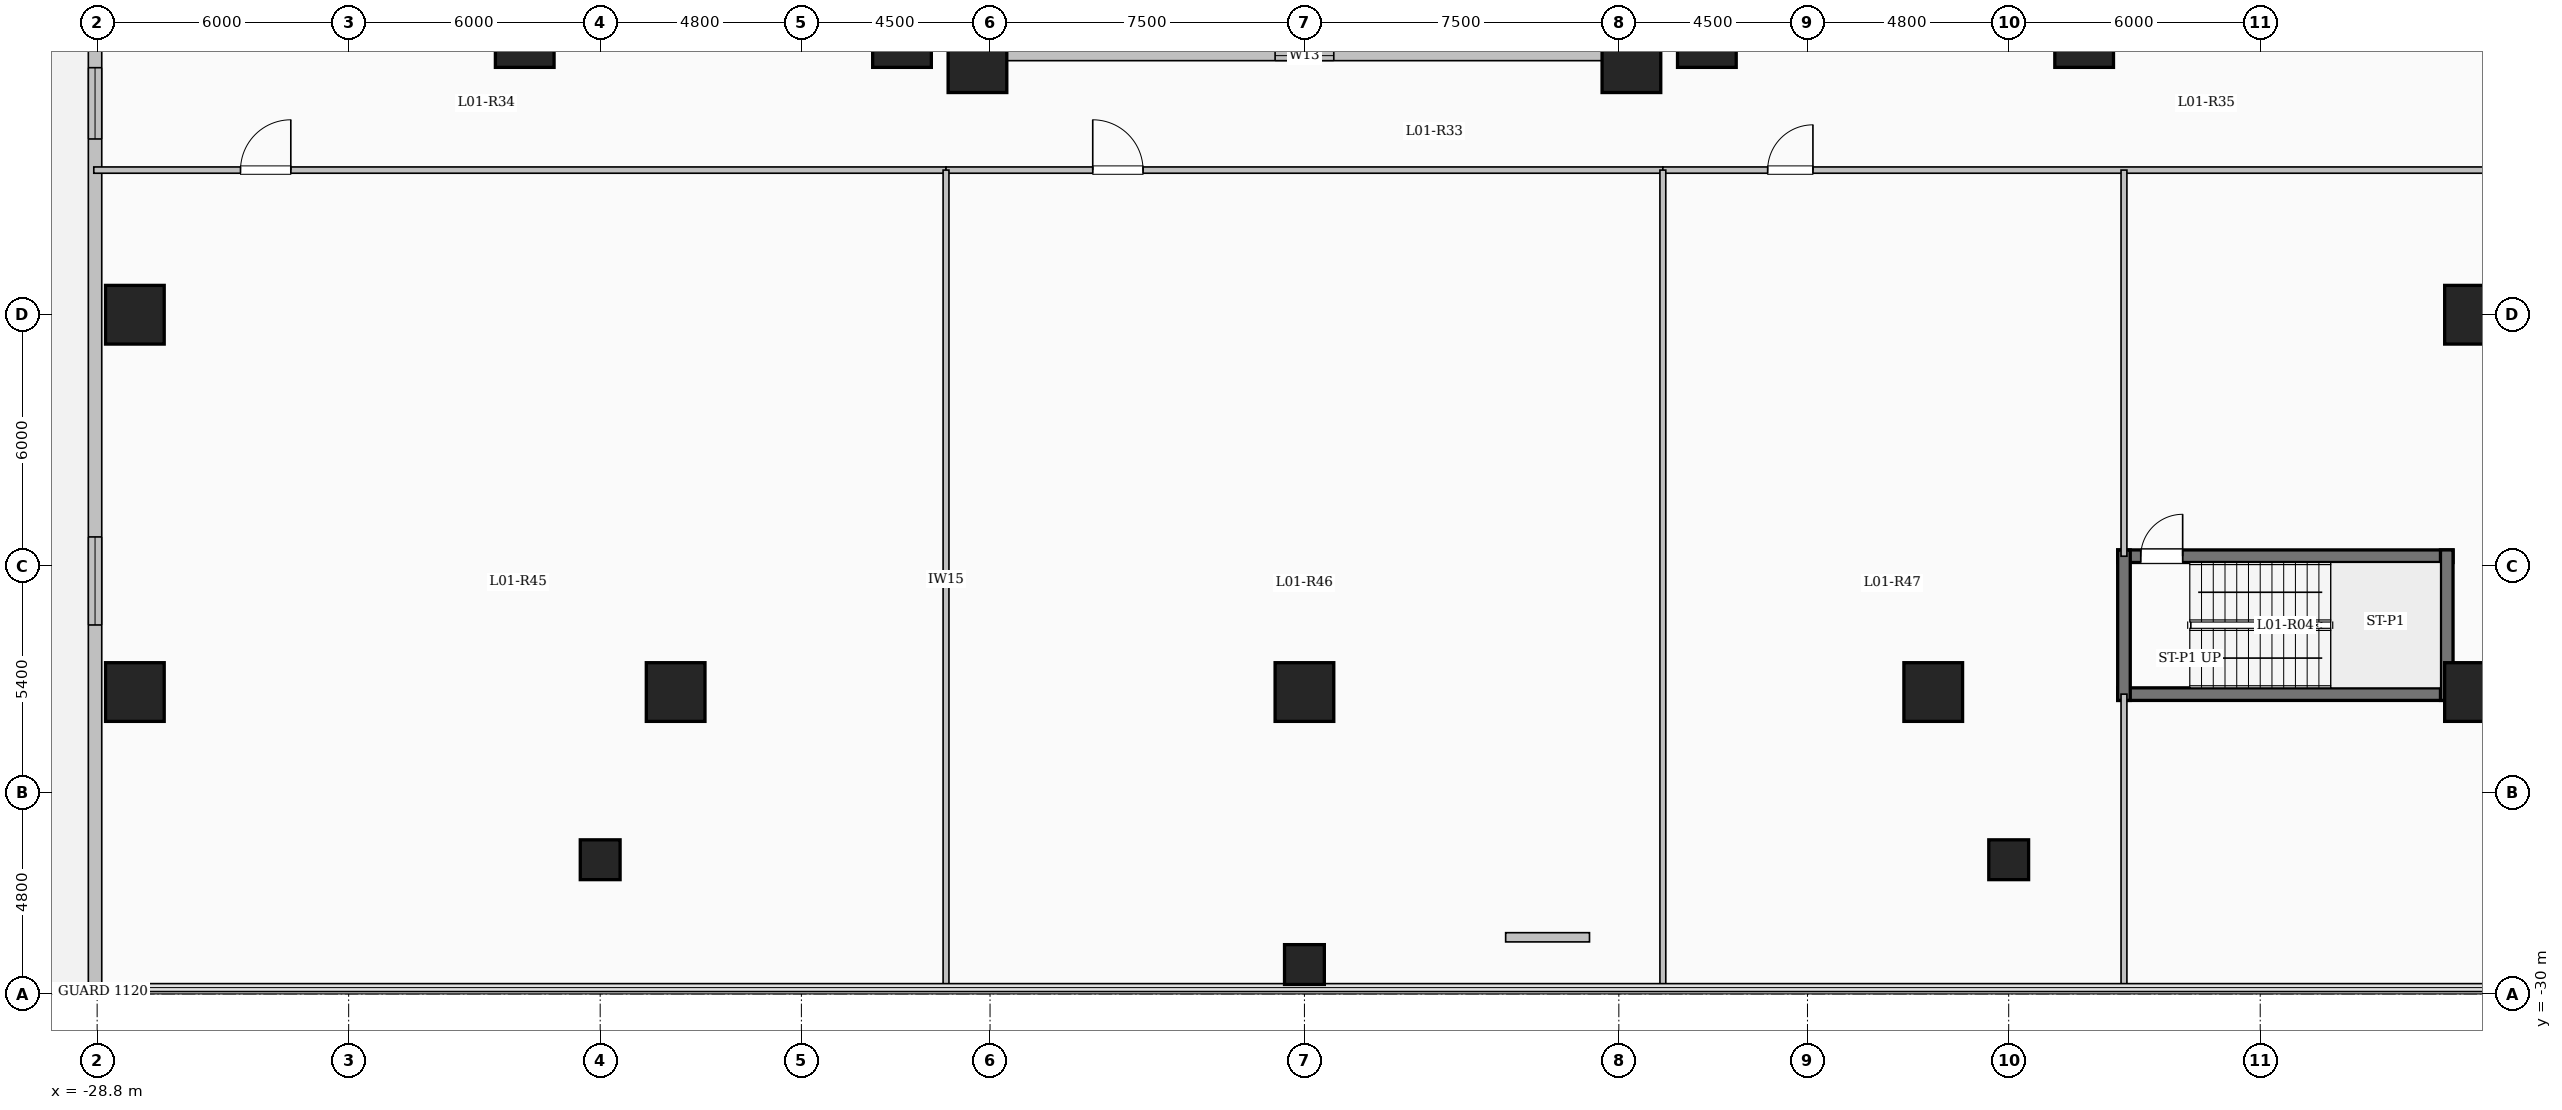
"""IFC4 building model, lengths in metres.
Left out: names, types, materials, properties, quantities, classifications, styles, units other than length and angle.
Written with IfcOpenShell. Run it as: python <this file> out.ifc"""

import sys

from ifc_helpers import new_model, si_unit, direction, frame, frame_2d, origin, origin_2d, place, context, subcontext, project, spatial, rectangle, circle, extrude, element, fill, save


model = new_model("IFC4")
c1 = context("Model", 3, precision=1e-05, world=origin(), true_north=direction((0.0, 1.0)))
c2 = subcontext(c1, "Body", "Model", "MODEL_VIEW")
j1 = project(units=[si_unit("LENGTHUNIT", "METRE"), si_unit("PLANEANGLEUNIT", "RADIAN")], contexts=[c1])
p1 = place(None, origin())
s1 = spatial("IfcSite", under=j1, at=p1, CompositionType="ELEMENT")
p2 = place(p1, origin())
s2 = spatial("IfcBuilding", under=s1, at=p2, CompositionType="ELEMENT")
p3 = place(p2, frame((0.0, 0.0, 5.4)))
s3 = spatial("IfcBuildingStorey", under=s2, at=p3, CompositionType="ELEMENT", Elevation=5.4)
for number, where, z_axis, x_axis in (
    (1, (-7.8, -7.8, 0.0), (0.0, 0.0, 1.0), (1.0, 0.0, 0.0)),
    (2, (7.8, -7.8, 0.0), (0.0, 0.0, 1.0), (1.0, 0.0, 0.0)),
    (3, (-9.6, -7.2, 0.0), (0.0, 0.0, 1.0), (1.0, 0.0, 0.0)),
    (4, (9.6, -7.2, 0.0), (0.0, 0.0, 1.0), (1.0, 0.0, 0.0)),
    (5, (-18.6, -7.2, 0.0), (0.0, 0.0, 1.0), (1.0, 0.0, 0.0)),
    (6, (18.6, -7.2, 0.0), (0.0, 0.0, 1.0), (1.0, 0.0, 0.0)),
):
    element("IfcColumn", number, at=place(p3, frame(where, z_axis=z_axis, x_axis=x_axis)), inside=s3, PredefinedType="COLUMN", context=c2, shape_type="SweptSolid", body=[
        extrude(rectangle(XDim=1.4, YDim=1.4, at=origin_2d()), origin(), (0.0, 0.0, 1.0), 4.5),
    ])
for number, where, z_axis, x_axis in (
    (7, (-16.8, -26.8, 0.0), (0.0, 0.0, 1.0), (1.0, 0.0, 0.0)),
    (8, (0.0, -29.3, 0.0), (0.0, 0.0, 1.0), (1.0, 0.0, 0.0)),
    (9, (16.8, -26.8, 0.0), (0.0, 0.0, 1.0), (1.0, 0.0, 0.0)),
):
    element("IfcColumn", number, at=place(p3, frame(where, z_axis=z_axis, x_axis=x_axis)), inside=s3, PredefinedType="PILASTER", context=c2, shape_type="SweptSolid", body=[
        extrude(circle(Radius=0.475, at=origin_2d()), origin(), (0.0, 0.0, 1.0), 4.5),
    ])
for number, where, z_axis, x_axis in (
    (10, (-27.9, -22.8, 0.0), (0.0, 0.0, 1.0), (1.0, 0.0, 0.0)),
    (11, (-15.0, -22.8, 0.0), (0.0, 0.0, 1.0), (1.0, 0.0, 0.0)),
    (12, (0.0, -22.8, 0.0), (0.0, 0.0, 1.0), (1.0, 0.0, 0.0)),
    (13, (15.0, -22.8, 0.0), (0.0, 0.0, 1.0), (1.0, 0.0, 0.0)),
    (14, (27.9, -22.8, 0.0), (0.0, 0.0, 1.0), (1.0, 0.0, 0.0)),
    (15, (-27.9, -13.8, 0.0), (0.0, 0.0, 1.0), (1.0, 0.0, 0.0)),
    (16, (27.9, -13.8, 0.0), (0.0, 0.0, 1.0), (1.0, 0.0, 0.0)),
):
    element("IfcColumn", number, at=place(p3, frame(where, z_axis=z_axis, x_axis=x_axis)), inside=s3, PredefinedType="COLUMN", context=c2, shape_type="SweptSolid", body=[
        extrude(rectangle(XDim=1.4, YDim=1.4, at=origin_2d()), origin(), (0.0, 0.0, 1.0), 4.5),
    ])
p4 = place(p3, frame((-7.62, -7.62, 0.0), z_axis=(0.0, 0.0, 1.0), x_axis=(1.0, 0.0, 0.0)))
e17 = element("IfcWall", 17, at=p4, inside=s3, PredefinedType="SOLIDWALL", context=c2, shape_type="SweptSolid", body=[
    extrude(rectangle(XDim=15.24, YDim=0.24, at=frame_2d((7.62, 0.0))), origin(), (0.0, 0.0, 1.0), 4.2),
])
p5 = place(p4, frame((6.92, 0.0, 0.95)))
e18 = element("IfcOpeningElement", 18, at=p5, cuts=e17, PredefinedType="OPENING", context=c2, shape_type="SweptSolid", body=[
    extrude(rectangle(XDim=1.4, YDim=1.5, at=frame_2d((0.7, 0.75))), frame((0.0, 0.13, 0.0), z_axis=(0.0, -1.0, 0.0), x_axis=(1.0, 0.0, 0.0)), (0.0, 0.0, 1.0), 0.26),
])
p6 = place(p3, frame((7.62, -7.62, 0.0), z_axis=(0.0, 0.0, 1.0), x_axis=(0.0, 1.0, 0.0)))
e19 = element("IfcWall", 19, at=p6, inside=s3, PredefinedType="SOLIDWALL", context=c2, shape_type="SweptSolid", body=[
    extrude(rectangle(XDim=15.24, YDim=0.24, at=frame_2d((7.62, 0.0))), origin(), (0.0, 0.0, 1.0), 4.2),
])
p7 = place(p6, frame((6.92, 0.0, 0.95)))
e20 = element("IfcOpeningElement", 20, at=p7, cuts=e19, PredefinedType="OPENING", context=c2, shape_type="SweptSolid", body=[
    extrude(rectangle(XDim=1.4, YDim=1.5, at=frame_2d((0.7, 0.75))), frame((0.0, 0.13, 0.0), z_axis=(0.0, -1.0, 0.0), x_axis=(1.0, 0.0, 0.0)), (0.0, 0.0, 1.0), 0.26),
])
p8 = place(p3, frame((-7.62, 7.62, 0.0), z_axis=(0.0, 0.0, 1.0), x_axis=(0.0, -1.0, 0.0)))
e21 = element("IfcWall", 21, at=p8, inside=s3, PredefinedType="SOLIDWALL", context=c2, shape_type="SweptSolid", body=[
    extrude(rectangle(XDim=15.24, YDim=0.24, at=frame_2d((7.62, 0.0))), origin(), (0.0, 0.0, 1.0), 4.2),
])
p9 = place(p8, frame((6.92, 0.0, 0.95)))
e22 = element("IfcOpeningElement", 22, at=p9, cuts=e21, PredefinedType="OPENING", context=c2, shape_type="SweptSolid", body=[
    extrude(rectangle(XDim=1.4, YDim=1.5, at=frame_2d((0.7, 0.75))), frame((0.0, 0.13, 0.0), z_axis=(0.0, -1.0, 0.0), x_axis=(1.0, 0.0, 0.0)), (0.0, 0.0, 1.0), 0.26),
])
p10 = place(p3, frame((-28.85, -29.85, 0.0), z_axis=(0.0, 0.0, 1.0), x_axis=(0.0, 1.0, 0.0)))
e23 = element("IfcWall", 23, at=p10, inside=s3, PredefinedType="SOLIDWALL", context=c2, shape_type="SweptSolid", body=[
    extrude(rectangle(XDim=59.7, YDim=0.32, at=frame_2d((29.85, 0.0))), origin(), (0.0, 0.0, 1.0), 4.2),
])
p11 = place(p10, frame((31.25, 0.0, 0.0)))
e24 = element("IfcOpeningElement", 24, at=p11, cuts=e23, PredefinedType="OPENING", context=c2, shape_type="SweptSolid", body=[
    extrude(rectangle(XDim=1.25, YDim=2.25, at=frame_2d((0.625, 1.125))), frame((0.0, 0.17, 0.0), z_axis=(0.0, -1.0, 0.0), x_axis=(1.0, 0.0, 0.0)), (0.0, 0.0, 1.0), 0.34),
])
p12 = place(p10, frame((8.65, 0.0, 0.9)))
e25 = element("IfcOpeningElement", 25, at=p12, cuts=e23, PredefinedType="OPENING", context=c2, shape_type="SweptSolid", body=[
    extrude(rectangle(XDim=2.1, YDim=2.0, at=frame_2d((1.05, 1.0))), frame((0.0, 0.17, 0.0), z_axis=(0.0, -1.0, 0.0), x_axis=(1.0, 0.0, 0.0)), (0.0, 0.0, 1.0), 0.34),
])
p13 = place(p10, frame((20.242, 0.0, 0.9)))
e26 = element("IfcOpeningElement", 26, at=p13, cuts=e23, PredefinedType="OPENING", context=c2, shape_type="SweptSolid", body=[
    extrude(rectangle(XDim=1.7, YDim=1.9, at=frame_2d((0.85, 0.95))), frame((0.0, 0.17, 0.0), z_axis=(0.0, -1.0, 0.0), x_axis=(1.0, 0.0, 0.0)), (0.0, 0.0, 1.0), 0.34),
])
p14 = place(p10, frame((26.03, 0.0, 0.9)))
e27 = element("IfcOpeningElement", 27, at=p14, cuts=e23, PredefinedType="OPENING", context=c2, shape_type="SweptSolid", body=[
    extrude(rectangle(XDim=2.1, YDim=2.0, at=frame_2d((1.05, 1.0))), frame((0.0, 0.17, 0.0), z_axis=(0.0, -1.0, 0.0), x_axis=(1.0, 0.0, 0.0)), (0.0, 0.0, 1.0), 0.34),
])
p15 = place(p10, frame((40.975, 0.0, 0.95)))
e28 = element("IfcOpeningElement", 28, at=p15, cuts=e23, PredefinedType="OPENING", context=c2, shape_type="SweptSolid", body=[
    extrude(rectangle(XDim=1.0, YDim=1.5, at=frame_2d((0.5, 0.75))), frame((0.0, 0.17, 0.0), z_axis=(0.0, -1.0, 0.0), x_axis=(1.0, 0.0, 0.0)), (0.0, 0.0, 1.0), 0.34),
])
p16 = place(p10, frame((50.0, 0.0, 0.9)))
e29 = element("IfcOpeningElement", 29, at=p16, cuts=e23, PredefinedType="OPENING", context=c2, shape_type="SweptSolid", body=[
    extrude(rectangle(XDim=2.1, YDim=2.0, at=frame_2d((1.05, 1.0))), frame((0.0, 0.17, 0.0), z_axis=(0.0, -1.0, 0.0), x_axis=(1.0, 0.0, 0.0)), (0.0, 0.0, 1.0), 0.34),
])
p17 = place(p3, frame((4.8, -28.65, 0.0), z_axis=(0.0, 0.0, 1.0), x_axis=(1.0, 0.0, 0.0)))
e30 = element("IfcWall", 30, at=p17, inside=s3, PredefinedType="PARAPET", context=c2, shape_type="SweptSolid", body=[
    extrude(rectangle(XDim=2.0, YDim=0.22, at=frame_2d((1.0, 0.0))), origin(), (0.0, 0.0, 1.0), 0.85),
])
p18 = place(p3, frame((19.4, -19.56, 0.0), z_axis=(0.0, 0.0, 1.0), x_axis=(1.0, 0.0, 0.0)))
e31 = element("IfcWall", 31, at=p18, inside=s3, PredefinedType="SHEAR", context=c2, shape_type="SweptSolid", body=[
    extrude(rectangle(XDim=8.0, YDim=0.3, at=frame_2d((4.0, 0.0))), origin(), (0.0, 0.0, 1.0), 4.5),
])
p19 = place(p18, frame((0.55, 0.0, 0.0)))
e32 = element("IfcOpeningElement", 32, at=p19, cuts=e31, PredefinedType="OPENING", context=c2, shape_type="SweptSolid", body=[
    extrude(rectangle(XDim=1.0, YDim=2.15, at=frame_2d((0.5, 1.075))), frame((0.0, 0.16, 0.0), z_axis=(0.0, -1.0, 0.0), x_axis=(1.0, 0.0, 0.0)), (0.0, 0.0, 1.0), 0.32),
])
p20 = place(p3, frame((19.4, -22.85, 0.0), z_axis=(0.0, 0.0, 1.0), x_axis=(1.0, 0.0, 0.0)))
e33 = element("IfcWall", 33, at=p20, inside=s3, PredefinedType="SHEAR", context=c2, shape_type="SweptSolid", body=[
    extrude(rectangle(XDim=8.0, YDim=0.3, at=frame_2d((4.0, 0.0))), origin(), (0.0, 0.0, 1.0), 4.5),
])
for number, where, z_axis, x_axis in (
    (34, (19.55, -23.0, 0.0), (0.0, 0.0, 1.0), (0.0, 1.0, 0.0)),
    (35, (27.25, -23.0, 0.0), (0.0, 0.0, 1.0), (0.0, 1.0, 0.0)),
):
    element("IfcWall", number, at=place(p3, frame(where, z_axis=z_axis, x_axis=x_axis)), inside=s3, PredefinedType="SHEAR", context=c2, shape_type="SweptSolid", body=[
        extrude(rectangle(XDim=3.59, YDim=0.3, at=frame_2d((1.795, 0.0))), origin(), (0.0, 0.0, 1.0), 4.5),
    ])
p21 = place(p3, frame((-28.88, -10.35, 0.0), z_axis=(0.0, 0.0, 1.0), x_axis=(1.0, 0.0, 0.0)))
e36 = element("IfcWall", 36, at=p21, inside=s3, PredefinedType="PARTITIONING", context=c2, shape_type="SweptSolid", body=[
    extrude(rectangle(XDim=20.33, YDim=0.15, at=frame_2d((10.165, 0.0))), origin(), (0.0, 0.0, 1.0), 4.2),
])
p22 = place(p21, frame((3.5, 0.0, 0.0)))
e37 = element("IfcOpeningElement", 37, at=p22, cuts=e36, PredefinedType="OPENING", context=c2, shape_type="SweptSolid", body=[
    extrude(rectangle(XDim=1.2, YDim=2.15, at=frame_2d((0.6, 1.075))), frame((0.0, 0.085, 0.0), z_axis=(0.0, -1.0, 0.0), x_axis=(1.0, 0.0, 0.0)), (0.0, 0.0, 1.0), 0.17),
])
p23 = place(p3, frame((-8.55, -10.35, 0.0), z_axis=(0.0, 0.0, 1.0), x_axis=(1.0, 0.0, 0.0)))
e38 = element("IfcWall", 38, at=p23, inside=s3, PredefinedType="PARTITIONING", context=c2, shape_type="SweptSolid", body=[
    extrude(rectangle(XDim=17.1, YDim=0.15, at=frame_2d((8.55, 0.0))), origin(), (0.0, 0.0, 1.0), 4.2),
])
p24 = place(p23, frame((3.5, 0.0, 0.0)))
e39 = element("IfcOpeningElement", 39, at=p24, cuts=e38, PredefinedType="OPENING", context=c2, shape_type="SweptSolid", body=[
    extrude(rectangle(XDim=1.2, YDim=2.15, at=frame_2d((0.6, 1.075))), frame((0.0, 0.085, 0.0), z_axis=(0.0, -1.0, 0.0), x_axis=(1.0, 0.0, 0.0)), (0.0, 0.0, 1.0), 0.17),
])
p25 = place(p3, frame((8.55, -10.35, 0.0), z_axis=(0.0, 0.0, 1.0), x_axis=(1.0, 0.0, 0.0)))
e40 = element("IfcWall", 40, at=p25, inside=s3, PredefinedType="PARTITIONING", context=c2, shape_type="SweptSolid", body=[
    extrude(rectangle(XDim=24.33, YDim=0.15, at=frame_2d((12.165, 0.0))), origin(), (0.0, 0.0, 1.0), 4.2),
])
p26 = place(p25, frame((2.5, 0.0, 0.0)))
e41 = element("IfcOpeningElement", 41, at=p26, cuts=e40, PredefinedType="OPENING", context=c2, shape_type="SweptSolid", body=[
    extrude(rectangle(XDim=1.08, YDim=2.15, at=frame_2d((0.54, 1.075))), frame((0.0, 0.085, 0.0), z_axis=(0.0, -1.0, 0.0), x_axis=(1.0, 0.0, 0.0)), (0.0, 0.0, 1.0), 0.17),
])
for number, where, z_axis, x_axis in (
    (42, (-8.55, -29.88, 0.0), (0.0, 0.0, 1.0), (0.0, 1.0, 0.0)),
    (43, (8.55, -29.88, 0.0), (0.0, 0.0, 1.0), (0.0, 1.0, 0.0)),
):
    element("IfcWall", number, at=place(p3, frame(where, z_axis=z_axis, x_axis=x_axis)), inside=s3, PredefinedType="PARTITIONING", context=c2, shape_type="SweptSolid", body=[
        extrude(rectangle(XDim=19.53, YDim=0.14, at=frame_2d((9.765, 0.0))), origin(), (0.0, 0.0, 1.0), 4.2),
    ])
p27 = place(p3, frame((19.55, -29.88, 0.0), z_axis=(0.0, 0.0, 1.0), x_axis=(0.0, 1.0, 0.0)))
e44 = element("IfcWall", 44, at=p27, inside=s3, PredefinedType="PARTITIONING", context=c2, shape_type="SweptSolid", body=[
    extrude(rectangle(XDim=7.03, YDim=0.14, at=frame_2d((3.515, 0.0))), origin(), (0.0, 0.0, 1.0), 4.2),
])
p28 = place(p3, frame((19.55, -19.56, 0.0), z_axis=(0.0, 0.0, 1.0), x_axis=(0.0, 1.0, 0.0)))
e45 = element("IfcWall", 45, at=p28, inside=s3, PredefinedType="PARTITIONING", context=c2, shape_type="SweptSolid", body=[
    extrude(rectangle(XDim=9.21, YDim=0.14, at=frame_2d((4.605, 0.0))), origin(), (0.0, 0.0, 1.0), 4.2),
])
p29 = place(p5, origin())
e46 = element("IfcWindow", 46, at=p29, inside=s3, PartitioningType="SINGLE_PANEL", PredefinedType="WINDOW", context=c2, shape_type="SweptSolid", body=[
    extrude(rectangle(XDim=1.4, YDim=1.5, at=frame_2d((0.7, 0.75))), frame((0.0, 0.03, 0.0), z_axis=(0.0, -1.0, 0.0), x_axis=(1.0, 0.0, 0.0)), (0.0, 0.0, 1.0), 0.06),
])
fill(e18, e46)
p30 = place(p12, origin())
e47 = element("IfcWindow", 47, at=p30, inside=s3, PartitioningType="SINGLE_PANEL", PredefinedType="WINDOW", context=c2, shape_type="SweptSolid", body=[
    extrude(rectangle(XDim=2.1, YDim=2.0, at=frame_2d((1.05, 1.0))), frame((0.0, 0.03, 0.0), z_axis=(0.0, -1.0, 0.0), x_axis=(1.0, 0.0, 0.0)), (0.0, 0.0, 1.0), 0.06),
])
fill(e25, e47)
p31 = place(p13, origin())
e48 = element("IfcWindow", 48, at=p31, inside=s3, PartitioningType="SINGLE_PANEL", PredefinedType="WINDOW", context=c2, shape_type="SweptSolid", body=[
    extrude(rectangle(XDim=1.7, YDim=1.9, at=frame_2d((0.85, 0.95))), frame((0.0, 0.03, 0.0), z_axis=(0.0, -1.0, 0.0), x_axis=(1.0, 0.0, 0.0)), (0.0, 0.0, 1.0), 0.06),
])
fill(e26, e48)
p32 = place(p19, origin())
e49 = element("IfcDoor", 49, at=p32, inside=s3, OperationType="SINGLE_SWING_RIGHT", PredefinedType="DOOR", context=c2, shape_type="SweptSolid", body=[
    extrude(rectangle(XDim=1.0, YDim=2.15, at=frame_2d((0.5, 1.075))), frame((0.0, 0.025, 0.0), z_axis=(0.0, -1.0, 0.0), x_axis=(1.0, 0.0, 0.0)), (0.0, 0.0, 1.0), 0.05),
])
fill(e32, e49)
p33 = place(p22, origin())
e50 = element("IfcDoor", 50, at=p33, inside=s3, OperationType="SINGLE_SWING_RIGHT", PredefinedType="DOOR", context=c2, shape_type="SweptSolid", body=[
    extrude(rectangle(XDim=1.2, YDim=2.15, at=frame_2d((0.6, 1.075))), frame((0.0, 0.025, 0.0), z_axis=(0.0, -1.0, 0.0), x_axis=(1.0, 0.0, 0.0)), (0.0, 0.0, 1.0), 0.05),
])
fill(e37, e50)
p34 = place(p24, origin())
e51 = element("IfcDoor", 51, at=p34, inside=s3, OperationType="SINGLE_SWING_LEFT", PredefinedType="DOOR", context=c2, shape_type="SweptSolid", body=[
    extrude(rectangle(XDim=1.2, YDim=2.15, at=frame_2d((0.6, 1.075))), frame((0.0, 0.025, 0.0), z_axis=(0.0, -1.0, 0.0), x_axis=(1.0, 0.0, 0.0)), (0.0, 0.0, 1.0), 0.05),
])
fill(e39, e51)
p35 = place(p26, origin())
e52 = element("IfcDoor", 52, at=p35, inside=s3, OperationType="SINGLE_SWING_RIGHT", PredefinedType="DOOR", context=c2, shape_type="SweptSolid", body=[
    extrude(rectangle(XDim=1.08, YDim=2.15, at=frame_2d((0.54, 1.075))), frame((0.0, 0.025, 0.0), z_axis=(0.0, -1.0, 0.0), x_axis=(1.0, 0.0, 0.0)), (0.0, 0.0, 1.0), 0.05),
])
fill(e41, e52)
save(model, sys.argv[1])
